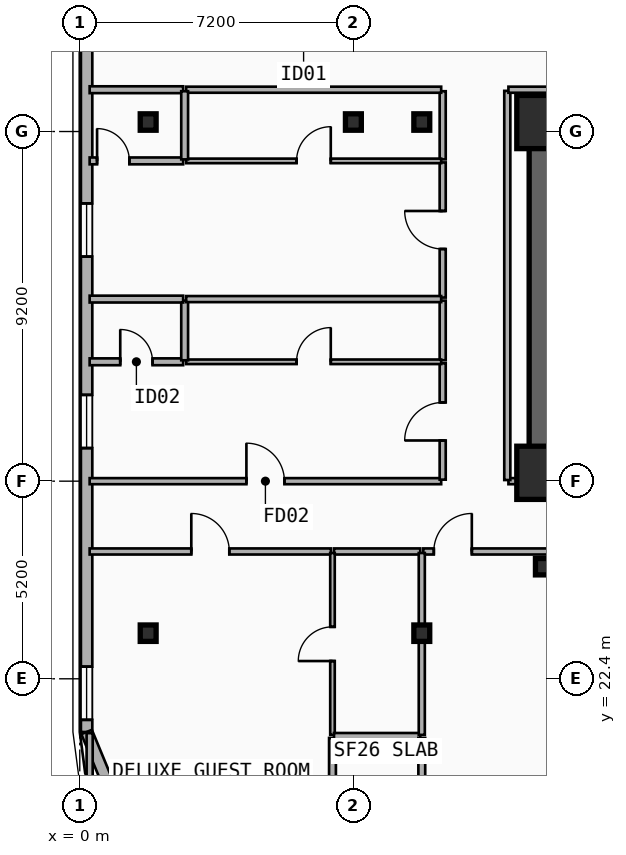
"""IFC4 building model, lengths in metres.
Left out: names, types, materials, properties, quantities, classifications, styles, units other than length and angle.
Written with IfcOpenShell. Run it as: python <this file> out.ifc"""

import sys

from ifc_helpers import new_model, si_unit, direction, frame, frame_2d, origin, origin_2d, place, context, subcontext, project, spatial, rectangle, i_section, extrude, element, fill, save


model = new_model("IFC4")
c1 = context("Model", 3, precision=1e-05, world=origin(), true_north=direction((0.0, 1.0)))
c2 = subcontext(c1, "Body", "Model", "MODEL_VIEW")
j1 = project(units=[si_unit("LENGTHUNIT", "METRE"), si_unit("PLANEANGLEUNIT", "RADIAN")], contexts=[c1])
p1 = place(None, origin())
s1 = spatial("IfcSite", under=j1, at=p1, CompositionType="ELEMENT")
p2 = place(p1, origin())
s2 = spatial("IfcBuilding", under=s1, at=p2, CompositionType="ELEMENT")
p3 = place(p2, frame((0.0, 0.0, 86.3)))
s3 = spatial("IfcBuildingStorey", under=s2, at=p3, CompositionType="ELEMENT", Elevation=86.3)
p4 = place(p3, frame((12.15, 37.05, 0.0), z_axis=(0.0, 0.0, 1.0), x_axis=(1.0, 0.0, 0.0)))
e1 = element("IfcWall", 1, at=p4, inside=s3, PredefinedType="SHEAR", context=c2, shape_type="SweptSolid", body=[
    extrude(rectangle(XDim=33.23, YDim=0.65, at=frame_2d((16.615, 0.0))), origin(), (0.0, 0.0, 1.0), 3.5),
])
p5 = place(p3, frame((21.18, 27.82, 0.0), z_axis=(0.0, 0.0, 1.0), x_axis=(-1.0, 0.0, 0.0)))
e2 = element("IfcWall", 2, at=p5, inside=s3, PredefinedType="SHEAR", context=c2, shape_type="SweptSolid", body=[
    extrude(rectangle(XDim=9.03, YDim=0.65, at=frame_2d((4.515, 0.0))), origin(), (0.0, 0.0, 1.0), 3.5),
])
p6 = place(p5, frame((2.68, 0.0, 0.0)))
e3 = element("IfcOpeningElement", 3, at=p6, cuts=e2, PredefinedType="OPENING", context=c2, shape_type="SweptSolid", body=[
    extrude(rectangle(XDim=1.1, YDim=2.15, at=frame_2d((0.55, 1.075))), frame((0.0, 0.335, 0.0), z_axis=(0.0, -1.0, 0.0), x_axis=(1.0, 0.0, 0.0)), (0.0, 0.0, 1.0), 0.67),
])
p7 = place(p3, frame((12.15, 28.145, 0.0), z_axis=(0.0, 0.0, 1.0), x_axis=(0.0, 1.0, 0.0)))
e4 = element("IfcWall", 4, at=p7, inside=s3, PredefinedType="SHEAR", context=c2, shape_type="SweptSolid", body=[
    extrude(rectangle(XDim=8.58, YDim=0.65, at=frame_2d((4.29, 0.0))), origin(), (0.0, 0.0, 1.0), 3.5),
])
for number, where, z_axis, x_axis in (
    (5, (12.2, 27.82, 0.0), (0.0, 0.0, 1.0), (1.0, 0.0, 0.0)),
    (6, (12.2, 37.05, 0.0), (0.0, 0.0, 1.0), (1.0, 0.0, 0.0)),
):
    element("IfcColumn", number, at=place(p3, frame(where, z_axis=z_axis, x_axis=x_axis)), inside=s3, PredefinedType="COLUMN", context=c2, shape_type="SweptSolid", body=[
        extrude(rectangle(XDim=1.4, YDim=1.4, at=origin_2d()), origin(), (0.0, 0.0, 1.0), 3.5),
    ])
for number, where, z_axis, x_axis in (
    (7, (12.2, 25.35, 0.0), (0.0, 0.0, 1.0), (1.0, 0.0, 0.0)),
    (8, (9.0, 23.6, 0.0), (0.0, 0.0, 1.0), (1.0, 0.0, 0.0)),
    (9, (9.0, 37.05, 0.0), (0.0, 0.0, 1.0), (1.0, 0.0, 0.0)),
    (10, (1.8, 23.6, 0.0), (0.0, 0.0, 1.0), (1.0, 0.0, 0.0)),
    (11, (1.8, 37.05, 0.0), (0.0, 0.0, 1.0), (1.0, 0.0, 0.0)),
    (12, (7.2, 37.05, 0.0), (0.0, 0.0, 1.0), (1.0, 0.0, 0.0)),
):
    element("IfcColumn", number, at=place(p3, frame(where, z_axis=z_axis, x_axis=x_axis)), inside=s3, PredefinedType="COLUMN", context=c2, shape_type="SweptSolid", body=[
        extrude(i_section(OverallWidth=0.418, OverallDepth=0.432, WebThickness=0.035, FlangeThickness=0.056, FilletRadius=0.015, at=origin_2d()), origin(), (0.0, 0.0, 1.0), 3.5),
    ])
p8 = place(p3, frame((0.18, 21.0, 0.0), z_axis=(0.0, 0.0, 1.0), x_axis=(0.0, 1.0, 0.0)))
e13 = element("IfcWall", 13, at=p8, inside=s3, PredefinedType="SOLIDWALL", context=c2, shape_type="SweptSolid", body=[
    extrude(rectangle(XDim=18.0, YDim=0.3, at=frame_2d((9.0, 0.0))), origin(), (0.0, 0.0, 1.0), 3.24),
])
p9 = place(p8, frame((7.47, 0.0, 0.48)))
e14 = element("IfcOpeningElement", 14, at=p9, cuts=e13, PredefinedType="OPENING", context=c2, shape_type="SweptSolid", body=[
    extrude(rectangle(XDim=1.4, YDim=1.8, at=frame_2d((0.7, 0.9))), frame((0.0, 0.16, 0.0), z_axis=(0.0, -1.0, 0.0), x_axis=(1.0, 0.0, 0.0)), (0.0, 0.0, 1.0), 0.32),
])
p10 = place(p8, frame((12.509, 0.0, 0.48)))
e15 = element("IfcOpeningElement", 15, at=p10, cuts=e13, PredefinedType="OPENING", context=c2, shape_type="SweptSolid", body=[
    extrude(rectangle(XDim=1.4, YDim=1.8, at=frame_2d((0.7, 0.9))), frame((0.0, 0.16, 0.0), z_axis=(0.0, -1.0, 0.0), x_axis=(1.0, 0.0, 0.0)), (0.0, 0.0, 1.0), 0.32),
])
p11 = place(p8, frame((0.32, 0.0, 0.65)))
e16 = element("IfcOpeningElement", 16, at=p11, cuts=e13, PredefinedType="OPENING", context=c2, shape_type="SweptSolid", body=[
    extrude(rectangle(XDim=1.4, YDim=1.8, at=frame_2d((0.7, 0.9))), frame((0.0, 0.16, 0.0), z_axis=(0.0, -1.0, 0.0), x_axis=(1.0, 0.0, 0.0)), (0.0, 0.0, 1.0), 0.32),
])
p12 = place(p3, frame((1.357, 18.157, 0.0), z_axis=(0.0, 0.0, 1.0), x_axis=(-0.382704529509, 0.923870793506, 0.0)))
e17 = element("IfcWall", 17, at=p12, inside=s3, PredefinedType="SOLIDWALL", context=c2, shape_type="SweptSolid", body=[
    extrude(rectangle(XDim=3.077, YDim=0.3, at=frame_2d((1.538, 0.0))), origin(), (0.0, 0.0, 1.0), 3.24),
])
p13 = place(p3, frame((0.26, 27.6, 0.0), z_axis=(0.0, 0.0, 1.0), x_axis=(1.0, 0.0, 0.0)))
e18 = element("IfcWall", 18, at=p13, inside=s3, PredefinedType="PARTITIONING", context=c2, shape_type="SweptSolid", body=[
    extrude(rectangle(XDim=9.25, YDim=0.16, at=frame_2d((4.625, 0.0))), origin(), (0.0, 0.0, 1.0), 2.57),
])
p14 = place(p13, frame((4.125, 0.0, 0.0)))
e19 = element("IfcOpeningElement", 19, at=p14, cuts=e18, PredefinedType="OPENING", context=c2, shape_type="SweptSolid", body=[
    extrude(rectangle(XDim=1.0, YDim=2.15, at=frame_2d((0.5, 1.075))), frame((0.0, 0.09, 0.0), z_axis=(0.0, -1.0, 0.0), x_axis=(1.0, 0.0, 0.0)), (0.0, 0.0, 1.0), 0.18),
])
p15 = place(p3, frame((0.26, 25.75, 0.0), z_axis=(0.0, 0.0, 1.0), x_axis=(1.0, 0.0, 0.0)))
e20 = element("IfcWall", 20, at=p15, inside=s3, PredefinedType="PARTITIONING", context=c2, shape_type="SweptSolid", body=[
    extrude(rectangle(XDim=6.35, YDim=0.16, at=frame_2d((3.175, 0.0))), origin(), (0.0, 0.0, 1.0), 2.57),
])
p16 = place(p15, frame((2.675, 0.0, 0.0)))
e21 = element("IfcOpeningElement", 21, at=p16, cuts=e20, PredefinedType="OPENING", context=c2, shape_type="SweptSolid", body=[
    extrude(rectangle(XDim=1.0, YDim=2.15, at=frame_2d((0.5, 1.075))), frame((0.0, 0.09, 0.0), z_axis=(0.0, -1.0, 0.0), x_axis=(1.0, 0.0, 0.0)), (0.0, 0.0, 1.0), 0.18),
])
p17 = place(p3, frame((6.69, 25.75, 0.0), z_axis=(0.0, 0.0, 1.0), x_axis=(1.0, 0.0, 0.0)))
e22 = element("IfcWall", 22, at=p17, inside=s3, PredefinedType="PARTITIONING", context=c2, shape_type="SweptSolid", body=[
    extrude(rectangle(XDim=2.27, YDim=0.16, at=frame_2d((1.135, 0.0))), origin(), (0.0, 0.0, 1.0), 2.57),
])
p18 = place(p3, frame((9.04, 25.75, 0.0), z_axis=(0.0, 0.0, 1.0), x_axis=(1.0, 0.0, 0.0)))
e23 = element("IfcWall", 23, at=p18, inside=s3, PredefinedType="PARTITIONING", context=c2, shape_type="SweptSolid", body=[
    extrude(rectangle(XDim=4.557, YDim=0.16, at=frame_2d((2.278, 0.0))), origin(), (0.0, 0.0, 1.0), 2.31),
])
p19 = place(p18, frame((0.277, 0.0, 0.0)))
e24 = element("IfcOpeningElement", 24, at=p19, cuts=e23, PredefinedType="OPENING", context=c2, shape_type="SweptSolid", body=[
    extrude(rectangle(XDim=1.0, YDim=2.15, at=frame_2d((0.5, 1.075))), frame((0.0, 0.09, 0.0), z_axis=(0.0, -1.0, 0.0), x_axis=(1.0, 0.0, 0.0)), (0.0, 0.0, 1.0), 0.18),
])
p20 = place(p3, frame((9.55, 27.64, 0.0), z_axis=(0.0, 0.0, 1.0), x_axis=(0.0, 1.0, 0.0)))
e25 = element("IfcWall", 25, at=p20, inside=s3, PredefinedType="PARTITIONING", context=c2, shape_type="SweptSolid", body=[
    extrude(rectangle(XDim=3.061, YDim=0.16, at=frame_2d((1.531, 0.0))), origin(), (0.0, 0.0, 1.0), 3.24),
])
p21 = place(p20, frame((1.031, 0.0, 0.0)))
e26 = element("IfcOpeningElement", 26, at=p21, cuts=e25, PredefinedType="OPENING", context=c2, shape_type="SweptSolid", body=[
    extrude(rectangle(XDim=1.0, YDim=2.15, at=frame_2d((0.5, 1.075))), frame((0.0, 0.09, 0.0), z_axis=(0.0, -1.0, 0.0), x_axis=(1.0, 0.0, 0.0)), (0.0, 0.0, 1.0), 0.18),
])
p22 = place(p3, frame((9.55, 30.781, 0.0), z_axis=(0.0, 0.0, 1.0), x_axis=(0.0, 1.0, 0.0)))
e27 = element("IfcWall", 27, at=p22, inside=s3, PredefinedType="PARTITIONING", context=c2, shape_type="SweptSolid", body=[
    extrude(rectangle(XDim=1.57, YDim=0.16, at=frame_2d((0.785, 0.0))), origin(), (0.0, 0.0, 1.0), 3.24),
])
p23 = place(p3, frame((9.55, 32.431, 0.0), z_axis=(0.0, 0.0, 1.0), x_axis=(0.0, 1.0, 0.0)))
e28 = element("IfcWall", 28, at=p23, inside=s3, PredefinedType="PARTITIONING", context=c2, shape_type="SweptSolid", body=[
    extrude(rectangle(XDim=3.556, YDim=0.16, at=frame_2d((1.778, 0.0))), origin(), (0.0, 0.0, 1.0), 3.24),
])
p24 = place(p23, frame((1.278, 0.0, 0.0)))
e29 = element("IfcOpeningElement", 29, at=p24, cuts=e28, PredefinedType="OPENING", context=c2, shape_type="SweptSolid", body=[
    extrude(rectangle(XDim=1.0, YDim=2.15, at=frame_2d((0.5, 1.075))), frame((0.0, 0.09, 0.0), z_axis=(0.0, -1.0, 0.0), x_axis=(1.0, 0.0, 0.0)), (0.0, 0.0, 1.0), 0.18),
])
p25 = place(p3, frame((9.55, 36.067, 0.0), z_axis=(0.0, 0.0, 1.0), x_axis=(0.0, 1.0, 0.0)))
e30 = element("IfcWall", 30, at=p25, inside=s3, PredefinedType="PARTITIONING", context=c2, shape_type="SweptSolid", body=[
    extrude(rectangle(XDim=1.793, YDim=0.16, at=frame_2d((0.896, 0.0))), origin(), (0.0, 0.0, 1.0), 2.72),
])
p26 = place(p3, frame((0.26, 37.9, 0.0), z_axis=(0.0, 0.0, 1.0), x_axis=(1.0, 0.0, 0.0)))
e31 = element("IfcWall", 31, at=p26, inside=s3, PredefinedType="PLUMBINGWALL", context=c2, shape_type="SweptSolid", body=[
    extrude(rectangle(XDim=2.46, YDim=0.18, at=frame_2d((1.23, 0.0))), origin(), (0.0, 0.0, 1.0), 3.24),
])
p27 = place(p3, frame((2.8, 37.9, 0.0), z_axis=(0.0, 0.0, 1.0), x_axis=(1.0, 0.0, 0.0)))
e32 = element("IfcWall", 32, at=p27, inside=s3, PredefinedType="PARTITIONING", context=c2, shape_type="SweptSolid", body=[
    extrude(rectangle(XDim=6.71, YDim=0.16, at=frame_2d((3.355, 0.0))), origin(), (0.0, 0.0, 1.0), 3.24),
])
p28 = place(p3, frame((0.26, 30.741, 0.0), z_axis=(0.0, 0.0, 1.0), x_axis=(1.0, 0.0, 0.0)))
e33 = element("IfcWall", 33, at=p28, inside=s3, PredefinedType="PLUMBINGWALL", context=c2, shape_type="SweptSolid", body=[
    extrude(rectangle(XDim=2.46, YDim=0.18, at=frame_2d((1.23, 0.0))), origin(), (0.0, 0.0, 1.0), 2.57),
])
p29 = place(p28, frame((0.805, 0.0, 0.0)))
e34 = element("IfcOpeningElement", 34, at=p29, cuts=e33, PredefinedType="OPENING", context=c2, shape_type="SweptSolid", body=[
    extrude(rectangle(XDim=0.85, YDim=2.1, at=frame_2d((0.425, 1.05))), frame((0.0, 0.1, 0.0), z_axis=(0.0, -1.0, 0.0), x_axis=(1.0, 0.0, 0.0)), (0.0, 0.0, 1.0), 0.2),
])
p30 = place(p3, frame((2.8, 30.741, 0.0), z_axis=(0.0, 0.0, 1.0), x_axis=(1.0, 0.0, 0.0)))
e35 = element("IfcWall", 35, at=p30, inside=s3, PredefinedType="PARTITIONING", context=c2, shape_type="SweptSolid", body=[
    extrude(rectangle(XDim=6.71, YDim=0.12, at=frame_2d((3.355, 0.0))), origin(), (0.0, 0.0, 1.0), 2.57),
])
p31 = place(p30, frame((2.905, 0.0, 0.0)))
e36 = element("IfcOpeningElement", 36, at=p31, cuts=e35, PredefinedType="OPENING", context=c2, shape_type="SweptSolid", body=[
    extrude(rectangle(XDim=0.9, YDim=2.1, at=frame_2d((0.45, 1.05))), frame((0.0, 0.07, 0.0), z_axis=(0.0, -1.0, 0.0), x_axis=(1.0, 0.0, 0.0)), (0.0, 0.0, 1.0), 0.14),
])
p32 = place(p3, frame((2.76, 30.781, 0.0), z_axis=(0.0, 0.0, 1.0), x_axis=(0.0, 1.0, 0.0)))
e37 = element("IfcWall", 37, at=p32, inside=s3, PredefinedType="PLUMBINGWALL", context=c2, shape_type="SweptSolid", body=[
    extrude(rectangle(XDim=1.57, YDim=0.18, at=frame_2d((0.785, 0.0))), origin(), (0.0, 0.0, 1.0), 3.24),
])
p33 = place(p3, frame((0.26, 32.391, 0.0), z_axis=(0.0, 0.0, 1.0), x_axis=(1.0, 0.0, 0.0)))
e38 = element("IfcWall", 38, at=p33, inside=s3, PredefinedType="PLUMBINGWALL", context=c2, shape_type="SweptSolid", body=[
    extrude(rectangle(XDim=2.46, YDim=0.18, at=frame_2d((1.23, 0.0))), origin(), (0.0, 0.0, 1.0), 2.57),
])
p34 = place(p3, frame((2.8, 32.391, 0.0), z_axis=(0.0, 0.0, 1.0), x_axis=(1.0, 0.0, 0.0)))
e39 = element("IfcWall", 39, at=p34, inside=s3, PredefinedType="PARTITIONING", context=c2, shape_type="SweptSolid", body=[
    extrude(rectangle(XDim=6.71, YDim=0.16, at=frame_2d((3.355, 0.0))), origin(), (0.0, 0.0, 1.0), 2.57),
])
p35 = place(p3, frame((0.26, 36.027, 0.0), z_axis=(0.0, 0.0, 1.0), x_axis=(1.0, 0.0, 0.0)))
e40 = element("IfcWall", 40, at=p35, inside=s3, PredefinedType="PLUMBINGWALL", context=c2, shape_type="SweptSolid", body=[
    extrude(rectangle(XDim=2.46, YDim=0.18, at=frame_2d((1.23, 0.0))), origin(), (0.0, 0.0, 1.0), 2.57),
])
p36 = place(p35, frame((0.195, 0.0, 0.0)))
e41 = element("IfcOpeningElement", 41, at=p36, cuts=e40, PredefinedType="OPENING", context=c2, shape_type="SweptSolid", body=[
    extrude(rectangle(XDim=0.85, YDim=2.1, at=frame_2d((0.425, 1.05))), frame((0.0, 0.1, 0.0), z_axis=(0.0, -1.0, 0.0), x_axis=(1.0, 0.0, 0.0)), (0.0, 0.0, 1.0), 0.2),
])
p37 = place(p3, frame((2.8, 36.027, 0.0), z_axis=(0.0, 0.0, 1.0), x_axis=(1.0, 0.0, 0.0)))
e42 = element("IfcWall", 42, at=p37, inside=s3, PredefinedType="PARTITIONING", context=c2, shape_type="SweptSolid", body=[
    extrude(rectangle(XDim=6.71, YDim=0.12, at=frame_2d((3.355, 0.0))), origin(), (0.0, 0.0, 1.0), 2.57),
])
p38 = place(p37, frame((2.905, 0.0, 0.0)))
e43 = element("IfcOpeningElement", 43, at=p38, cuts=e42, PredefinedType="OPENING", context=c2, shape_type="SweptSolid", body=[
    extrude(rectangle(XDim=0.9, YDim=2.1, at=frame_2d((0.45, 1.05))), frame((0.0, 0.07, 0.0), z_axis=(0.0, -1.0, 0.0), x_axis=(1.0, 0.0, 0.0)), (0.0, 0.0, 1.0), 0.14),
])
p39 = place(p3, frame((2.76, 36.067, 0.0), z_axis=(0.0, 0.0, 1.0), x_axis=(0.0, 1.0, 0.0)))
e44 = element("IfcWall", 44, at=p39, inside=s3, PredefinedType="PLUMBINGWALL", context=c2, shape_type="SweptSolid", body=[
    extrude(rectangle(XDim=1.793, YDim=0.18, at=frame_2d((0.896, 0.0))), origin(), (0.0, 0.0, 1.0), 2.72),
])
p40 = place(p3, frame((6.65, 17.06, 0.0), z_axis=(0.0, 0.0, 1.0), x_axis=(0.0, 1.0, 0.0)))
e45 = element("IfcWall", 45, at=p40, inside=s3, PredefinedType="PLUMBINGWALL", context=c2, shape_type="SweptSolid", body=[
    extrude(rectangle(XDim=3.784, YDim=0.18, at=frame_2d((1.892, 0.0))), origin(), (0.0, 0.0, 1.0), 2.57),
])
p41 = place(p40, frame((0.25, 0.0, 0.0)))
e46 = element("IfcOpeningElement", 46, at=p41, cuts=e45, PredefinedType="OPENING", context=c2, shape_type="SweptSolid", body=[
    extrude(rectangle(XDim=0.85, YDim=2.1, at=frame_2d((0.425, 1.05))), frame((0.0, 0.1, 0.0), z_axis=(0.0, -1.0, 0.0), x_axis=(1.0, 0.0, 0.0)), (0.0, 0.0, 1.0), 0.2),
])
p42 = place(p3, frame((6.65, 20.924, 0.0), z_axis=(0.0, 0.0, 1.0), x_axis=(0.0, 1.0, 0.0)))
e47 = element("IfcWall", 47, at=p42, inside=s3, PredefinedType="PARTITIONING", context=c2, shape_type="SweptSolid", body=[
    extrude(rectangle(XDim=4.786, YDim=0.12, at=frame_2d((2.393, 0.0))), origin(), (0.0, 0.0, 1.0), 2.57),
])
p43 = place(p42, frame((1.943, 0.0, 0.0)))
e48 = element("IfcOpeningElement", 48, at=p43, cuts=e47, PredefinedType="OPENING", context=c2, shape_type="SweptSolid", body=[
    extrude(rectangle(XDim=0.9, YDim=2.1, at=frame_2d((0.45, 1.05))), frame((0.0, 0.07, 0.0), z_axis=(0.0, -1.0, 0.0), x_axis=(1.0, 0.0, 0.0)), (0.0, 0.0, 1.0), 0.14),
])
p44 = place(p3, frame((6.69, 20.884, 0.0), z_axis=(0.0, 0.0, 1.0), x_axis=(1.0, 0.0, 0.0)))
e49 = element("IfcWall", 49, at=p44, inside=s3, PredefinedType="PLUMBINGWALL", context=c2, shape_type="SweptSolid", body=[
    extrude(rectangle(XDim=2.27, YDim=0.18, at=frame_2d((1.135, 0.0))), origin(), (0.0, 0.0, 1.0), 2.57),
])
p45 = place(p3, frame((9.0, 17.06, 0.0), z_axis=(0.0, 0.0, 1.0), x_axis=(0.0, 1.0, 0.0)))
e50 = element("IfcWall", 50, at=p45, inside=s3, PredefinedType="PLUMBINGWALL", context=c2, shape_type="SweptSolid", body=[
    extrude(rectangle(XDim=3.784, YDim=0.18, at=frame_2d((1.892, 0.0))), origin(), (0.0, 0.0, 1.0), 2.72),
])
p46 = place(p3, frame((9.0, 20.924, 0.0), z_axis=(0.0, 0.0, 1.0), x_axis=(0.0, 1.0, 0.0)))
e51 = element("IfcWall", 51, at=p46, inside=s3, PredefinedType="PARTITIONING", context=c2, shape_type="SweptSolid", body=[
    extrude(rectangle(XDim=4.786, YDim=0.16, at=frame_2d((2.393, 0.0))), origin(), (0.0, 0.0, 1.0), 2.72),
])
p47 = place(p3, frame((11.28, 27.6, 0.0), z_axis=(0.0, 0.0, 1.0), x_axis=(1.0, 0.0, 0.0)))
e52 = element("IfcWall", 52, at=p47, inside=s3, PredefinedType="PARTITIONING", context=c2, shape_type="SweptSolid", body=[
    extrude(rectangle(XDim=0.84, YDim=0.16, at=frame_2d((0.42, 0.0))), origin(), (0.0, 0.0, 1.0), 2.28),
])
p48 = place(p3, frame((11.25, 27.63, 0.0), z_axis=(0.0, 0.0, 1.0), x_axis=(0.0, 1.0, 0.0)))
e53 = element("IfcWall", 53, at=p48, inside=s3, PredefinedType="PARTITIONING", context=c2, shape_type="SweptSolid", body=[
    extrude(rectangle(XDim=10.24, YDim=0.16, at=frame_2d((5.12, 0.0))), origin(), (0.0, 0.0, 1.0), 2.72),
])
p49 = place(p3, frame((11.28, 37.9, 0.0), z_axis=(0.0, 0.0, 1.0), x_axis=(1.0, 0.0, 0.0)))
e54 = element("IfcWall", 54, at=p49, inside=s3, PredefinedType="PARTITIONING", context=c2, shape_type="SweptSolid", body=[
    extrude(rectangle(XDim=35.04, YDim=0.16, at=frame_2d((17.52, 0.0))), origin(), (0.0, 0.0, 1.0), 3.24),
])
p50 = place(p3, frame((0.26, 17.09, 0.0), z_axis=(0.0, 0.0, 1.0), x_axis=(0.0, 1.0, 0.0)))
e55 = element("IfcWall", 55, at=p50, inside=s3, PredefinedType="PARTITIONING", context=c2, shape_type="SweptSolid", body=[
    extrude(rectangle(XDim=3.88, YDim=0.16, at=frame_2d((1.94, 0.0))), origin(), (0.0, 0.0, 1.0), 3.24),
])
p51 = place(p9, origin())
e56 = element("IfcWindow", 56, at=p51, inside=s3, PartitioningType="SINGLE_PANEL", PredefinedType="WINDOW", context=c2, shape_type="SweptSolid", body=[
    extrude(rectangle(XDim=1.4, YDim=1.8, at=frame_2d((0.7, 0.9))), frame((0.0, 0.03, 0.0), z_axis=(0.0, -1.0, 0.0), x_axis=(1.0, 0.0, 0.0)), (0.0, 0.0, 1.0), 0.06),
])
fill(e14, e56)
p52 = place(p10, origin())
e57 = element("IfcWindow", 57, at=p52, inside=s3, PartitioningType="SINGLE_PANEL", PredefinedType="WINDOW", context=c2, shape_type="SweptSolid", body=[
    extrude(rectangle(XDim=1.4, YDim=1.8, at=frame_2d((0.7, 0.9))), frame((0.0, 0.03, 0.0), z_axis=(0.0, -1.0, 0.0), x_axis=(1.0, 0.0, 0.0)), (0.0, 0.0, 1.0), 0.06),
])
fill(e15, e57)
p53 = place(p11, origin())
e58 = element("IfcWindow", 58, at=p53, inside=s3, PartitioningType="SINGLE_PANEL", PredefinedType="WINDOW", context=c2, shape_type="SweptSolid", body=[
    extrude(rectangle(XDim=1.4, YDim=1.8, at=frame_2d((0.7, 0.9))), frame((0.0, 0.03, 0.0), z_axis=(0.0, -1.0, 0.0), x_axis=(1.0, 0.0, 0.0)), (0.0, 0.0, 1.0), 0.06),
])
fill(e16, e58)
p54 = place(p14, origin())
e59 = element("IfcDoor", 59, at=p54, inside=s3, OperationType="SINGLE_SWING_LEFT", PredefinedType="DOOR", context=c2, shape_type="SweptSolid", body=[
    extrude(rectangle(XDim=1.0, YDim=2.15, at=frame_2d((0.5, 1.075))), frame((0.0, 0.025, 0.0), z_axis=(0.0, -1.0, 0.0), x_axis=(1.0, 0.0, 0.0)), (0.0, 0.0, 1.0), 0.05),
])
fill(e19, e59)
p55 = place(p16, origin())
e60 = element("IfcDoor", 60, at=p55, inside=s3, OperationType="SINGLE_SWING_LEFT", PredefinedType="DOOR", context=c2, shape_type="SweptSolid", body=[
    extrude(rectangle(XDim=1.0, YDim=2.15, at=frame_2d((0.5, 1.075))), frame((0.0, 0.025, 0.0), z_axis=(0.0, -1.0, 0.0), x_axis=(1.0, 0.0, 0.0)), (0.0, 0.0, 1.0), 0.05),
])
fill(e21, e60)
p56 = place(p19, origin())
e61 = element("IfcDoor", 61, at=p56, inside=s3, OperationType="SINGLE_SWING_RIGHT", PredefinedType="DOOR", context=c2, shape_type="SweptSolid", body=[
    extrude(rectangle(XDim=1.0, YDim=2.15, at=frame_2d((0.5, 1.075))), frame((0.0, 0.025, 0.0), z_axis=(0.0, -1.0, 0.0), x_axis=(1.0, 0.0, 0.0)), (0.0, 0.0, 1.0), 0.05),
])
fill(e24, e61)
p57 = place(p21, origin())
e62 = element("IfcDoor", 62, at=p57, inside=s3, OperationType="SINGLE_SWING_LEFT", PredefinedType="DOOR", context=c2, shape_type="SweptSolid", body=[
    extrude(rectangle(XDim=1.0, YDim=2.15, at=frame_2d((0.5, 1.075))), frame((0.0, 0.025, 0.0), z_axis=(0.0, -1.0, 0.0), x_axis=(1.0, 0.0, 0.0)), (0.0, 0.0, 1.0), 0.05),
])
fill(e26, e62)
p58 = place(p24, origin())
e63 = element("IfcDoor", 63, at=p58, inside=s3, OperationType="SINGLE_SWING_RIGHT", PredefinedType="DOOR", context=c2, shape_type="SweptSolid", body=[
    extrude(rectangle(XDim=1.0, YDim=2.15, at=frame_2d((0.5, 1.075))), frame((0.0, 0.025, 0.0), z_axis=(0.0, -1.0, 0.0), x_axis=(1.0, 0.0, 0.0)), (0.0, 0.0, 1.0), 0.05),
])
fill(e29, e63)
p59 = place(p29, origin())
e64 = element("IfcDoor", 64, at=p59, inside=s3, OperationType="SINGLE_SWING_LEFT", PredefinedType="DOOR", context=c2, shape_type="SweptSolid", body=[
    extrude(rectangle(XDim=0.85, YDim=2.1, at=frame_2d((0.425, 1.05))), frame((0.0, 0.025, 0.0), z_axis=(0.0, -1.0, 0.0), x_axis=(1.0, 0.0, 0.0)), (0.0, 0.0, 1.0), 0.05),
])
fill(e34, e64)
p60 = place(p31, origin())
e65 = element("IfcDoor", 65, at=p60, inside=s3, OperationType="SINGLE_SWING_RIGHT", PredefinedType="DOOR", context=c2, shape_type="SweptSolid", body=[
    extrude(rectangle(XDim=0.9, YDim=2.1, at=frame_2d((0.45, 1.05))), frame((0.0, 0.025, 0.0), z_axis=(0.0, -1.0, 0.0), x_axis=(1.0, 0.0, 0.0)), (0.0, 0.0, 1.0), 0.05),
])
fill(e36, e65)
p61 = place(p36, origin())
e66 = element("IfcDoor", 66, at=p61, inside=s3, OperationType="SINGLE_SWING_LEFT", PredefinedType="DOOR", context=c2, shape_type="SweptSolid", body=[
    extrude(rectangle(XDim=0.85, YDim=2.1, at=frame_2d((0.425, 1.05))), frame((0.0, 0.025, 0.0), z_axis=(0.0, -1.0, 0.0), x_axis=(1.0, 0.0, 0.0)), (0.0, 0.0, 1.0), 0.05),
])
fill(e41, e66)
p62 = place(p38, origin())
e67 = element("IfcDoor", 67, at=p62, inside=s3, OperationType="SINGLE_SWING_RIGHT", PredefinedType="DOOR", context=c2, shape_type="SweptSolid", body=[
    extrude(rectangle(XDim=0.9, YDim=2.1, at=frame_2d((0.45, 1.05))), frame((0.0, 0.025, 0.0), z_axis=(0.0, -1.0, 0.0), x_axis=(1.0, 0.0, 0.0)), (0.0, 0.0, 1.0), 0.05),
])
fill(e43, e67)
p63 = place(p43, origin())
e68 = element("IfcDoor", 68, at=p63, inside=s3, OperationType="SINGLE_SWING_LEFT", PredefinedType="DOOR", context=c2, shape_type="SweptSolid", body=[
    extrude(rectangle(XDim=0.9, YDim=2.1, at=frame_2d((0.45, 1.05))), frame((0.0, 0.025, 0.0), z_axis=(0.0, -1.0, 0.0), x_axis=(1.0, 0.0, 0.0)), (0.0, 0.0, 1.0), 0.05),
])
fill(e48, e68)
save(model, sys.argv[1])
